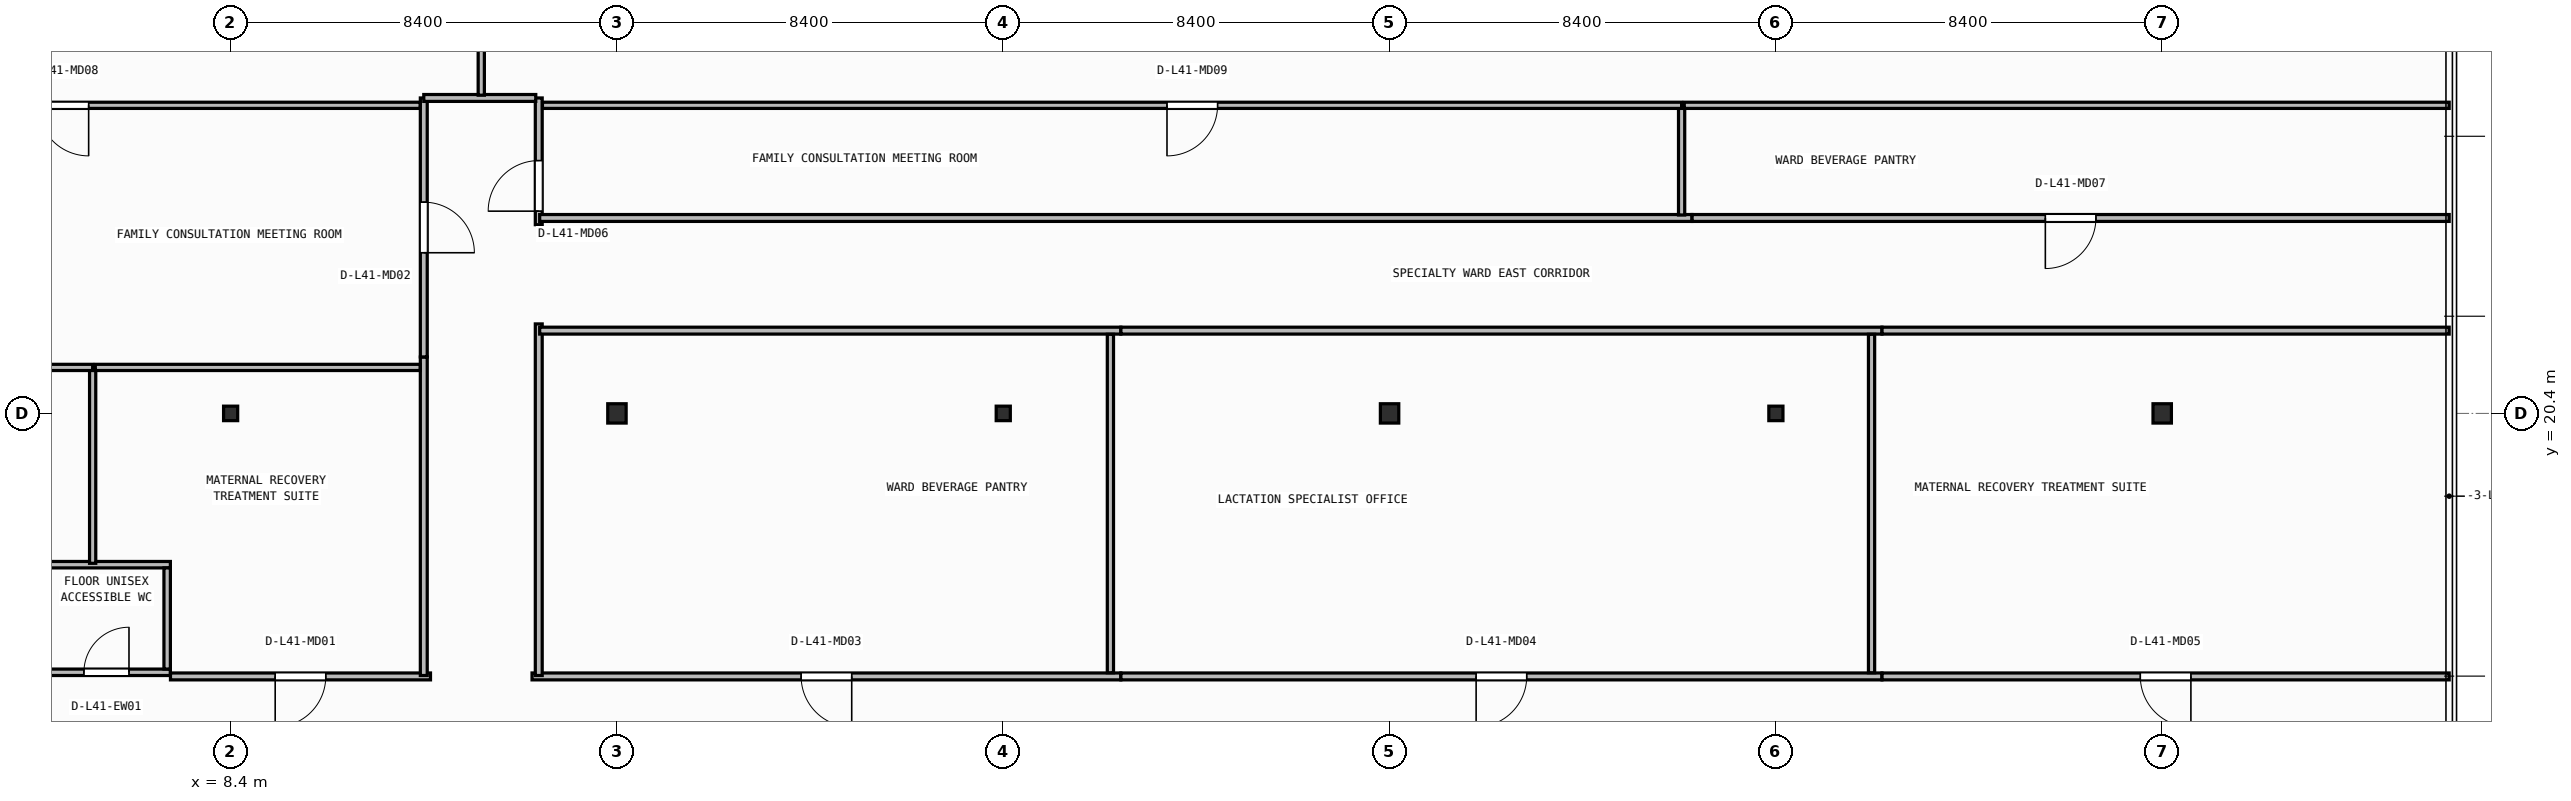
"""IFC4 building model, lengths in metres.
Left out: names, types, materials, properties, quantities, classifications, styles, units other than length and angle.
Written with IfcOpenShell. Run it as: python <this file> out.ifc"""

import sys

from ifc_helpers import new_model, si_unit, direction, frame, frame_2d, origin, origin_2d, place, context, subcontext, project, spatial, rectangle, i_section, extrude, element, fill, save


model = new_model("IFC4")
c1 = context("Model", 3, precision=1e-05, world=origin(), true_north=direction((0.0, 1.0)))
c2 = subcontext(c1, "Body", "Model", "MODEL_VIEW")
j1 = project(units=[si_unit("LENGTHUNIT", "METRE"), si_unit("PLANEANGLEUNIT", "RADIAN")], contexts=[c1])
p1 = place(None, origin())
s1 = spatial("IfcSite", under=j1, at=p1, CompositionType="ELEMENT")
p2 = place(p1, origin())
s2 = spatial("IfcBuilding", under=s1, at=p2, CompositionType="ELEMENT")
p3 = place(p2, frame((0.0, 0.0, 166.55)))
s3 = spatial("IfcBuildingStorey", under=s2, at=p3, CompositionType="ELEMENT", Elevation=166.55)
p4 = place(p3, frame((8.4, 20.4, 0.0), z_axis=(0.0, 0.0, 1.0), x_axis=(1.0, 0.0, 0.0)))
e1 = element("IfcColumn", 1, at=p4, inside=s3, PredefinedType="COLUMN", context=c2, shape_type="SweptSolid", body=[
    extrude(i_section(OverallWidth=0.307, OverallDepth=0.315, WebThickness=0.012, FlangeThickness=0.019, FilletRadius=0.017, at=origin_2d()), origin(), (0.0, 0.0, 1.0), 3.95),
])
p5 = place(p3, frame((16.8, 20.4, 0.0), z_axis=(0.0, 0.0, 1.0), x_axis=(1.0, 0.0, 0.0)))
e2 = element("IfcColumn", 2, at=p5, inside=s3, PredefinedType="COLUMN", context=c2, shape_type="SweptSolid", body=[
    extrude(i_section(OverallWidth=0.4, OverallDepth=0.42, WebThickness=0.025, FlangeThickness=0.04, at=origin_2d()), origin(), (0.0, 0.0, 1.0), 3.95),
])
p6 = place(p3, frame((25.2, 20.4, 0.0), z_axis=(0.0, 0.0, 1.0), x_axis=(1.0, 0.0, 0.0)))
e3 = element("IfcColumn", 3, at=p6, inside=s3, PredefinedType="COLUMN", context=c2, shape_type="SweptSolid", body=[
    extrude(i_section(OverallWidth=0.307, OverallDepth=0.315, WebThickness=0.012, FlangeThickness=0.019, FilletRadius=0.017, at=origin_2d()), origin(), (0.0, 0.0, 1.0), 3.95),
])
p7 = place(p3, frame((33.6, 20.4, 0.0), z_axis=(0.0, 0.0, 1.0), x_axis=(1.0, 0.0, 0.0)))
e4 = element("IfcColumn", 4, at=p7, inside=s3, PredefinedType="COLUMN", context=c2, shape_type="SweptSolid", body=[
    extrude(i_section(OverallWidth=0.4, OverallDepth=0.42, WebThickness=0.025, FlangeThickness=0.04, at=origin_2d()), origin(), (0.0, 0.0, 1.0), 3.95),
])
p8 = place(p3, frame((42.0, 20.4, 0.0), z_axis=(0.0, 0.0, 1.0), x_axis=(1.0, 0.0, 0.0)))
e5 = element("IfcColumn", 5, at=p8, inside=s3, PredefinedType="COLUMN", context=c2, shape_type="SweptSolid", body=[
    extrude(i_section(OverallWidth=0.307, OverallDepth=0.315, WebThickness=0.012, FlangeThickness=0.019, FilletRadius=0.017, at=origin_2d()), origin(), (0.0, 0.0, 1.0), 3.95),
])
p9 = place(p3, frame((50.4, 20.4, 0.0), z_axis=(0.0, 0.0, 1.0), x_axis=(1.0, 0.0, 0.0)))
e6 = element("IfcColumn", 6, at=p9, inside=s3, PredefinedType="COLUMN", context=c2, shape_type="SweptSolid", body=[
    extrude(i_section(OverallWidth=0.4, OverallDepth=0.42, WebThickness=0.025, FlangeThickness=0.04, at=origin_2d()), origin(), (0.0, 0.0, 1.0), 3.95),
])
p10 = place(p3, frame((4.31, 14.77, 0.0), z_axis=(0.0, 0.0, 1.0), x_axis=(1.0, 0.0, 0.0)))
e7 = element("IfcWall", 7, at=p10, inside=s3, PredefinedType="PARTITIONING", context=c2, shape_type="SweptSolid", body=[
    extrude(rectangle(XDim=2.78, YDim=0.14, at=frame_2d((1.39, 0.0))), origin(), (0.0, 0.0, 1.0), 3.71),
])
p11 = place(p10, frame((0.9, 0.0, 0.0)))
e8 = element("IfcOpeningElement", 8, at=p11, cuts=e7, PredefinedType="OPENING", context=c2, shape_type="SweptSolid", body=[
    extrude(rectangle(XDim=0.98, YDim=2.1, at=frame_2d((0.49, 1.05))), frame((0.0, 0.08, 0.0), z_axis=(0.0, -1.0, 0.0), x_axis=(1.0, 0.0, 0.0)), (0.0, 0.0, 1.0), 0.16),
])
p12 = place(p3, frame((4.31, 17.11, 0.0), z_axis=(0.0, 0.0, 1.0), x_axis=(1.0, 0.0, 0.0)))
e9 = element("IfcWall", 9, at=p12, inside=s3, PredefinedType="PARTITIONING", context=c2, shape_type="SweptSolid", body=[
    extrude(rectangle(XDim=2.78, YDim=0.14, at=frame_2d((1.39, 0.0))), origin(), (0.0, 0.0, 1.0), 3.71),
])
p13 = place(p3, frame((7.02, 14.84, 0.0), z_axis=(0.0, 0.0, 1.0), x_axis=(0.0, 1.0, 0.0)))
e10 = element("IfcWall", 10, at=p13, inside=s3, PredefinedType="PARTITIONING", context=c2, shape_type="SweptSolid", body=[
    extrude(rectangle(XDim=2.2, YDim=0.14, at=frame_2d((1.1, 0.0))), origin(), (0.0, 0.0, 1.0), 3.71),
])
p14 = place(p3, frame((12.746, 14.68, 0.0), z_axis=(0.0, 0.0, 1.0), x_axis=(-1.0, 0.0, 0.0)))
e11 = element("IfcWall", 11, at=p14, inside=s3, PredefinedType="PARTITIONING", context=c2, shape_type="SweptSolid", body=[
    extrude(rectangle(XDim=5.654, YDim=0.15, at=frame_2d((2.827, 0.0))), origin(), (0.0, 0.0, 1.0), 3.71),
])
p15 = place(p14, frame((2.277, 0.0, 0.0)))
e12 = element("IfcOpeningElement", 12, at=p15, cuts=e11, PredefinedType="OPENING", context=c2, shape_type="SweptSolid", body=[
    extrude(rectangle(XDim=1.1, YDim=2.1, at=frame_2d((0.55, 1.05))), frame((0.0, 0.085, 0.0), z_axis=(0.0, -1.0, 0.0), x_axis=(1.0, 0.0, 0.0)), (0.0, 0.0, 1.0), 0.17),
])
p16 = place(p3, frame((27.756, 14.68, 0.0), z_axis=(0.0, 0.0, 1.0), x_axis=(-1.0, 0.0, 0.0)))
e13 = element("IfcWall", 13, at=p16, inside=s3, PredefinedType="PARTITIONING", context=c2, shape_type="SweptSolid", body=[
    extrude(rectangle(XDim=12.802, YDim=0.15, at=frame_2d((6.401, 0.0))), origin(), (0.0, 0.0, 1.0), 3.71),
])
p17 = place(p16, frame((5.851, 0.0, 0.0)))
e14 = element("IfcOpeningElement", 14, at=p17, cuts=e13, PredefinedType="OPENING", context=c2, shape_type="SweptSolid", body=[
    extrude(rectangle(XDim=1.1, YDim=2.1, at=frame_2d((0.55, 1.05))), frame((0.0, 0.085, 0.0), z_axis=(0.0, -1.0, 0.0), x_axis=(1.0, 0.0, 0.0)), (0.0, 0.0, 1.0), 0.17),
])
p18 = place(p3, frame((44.306, 14.68, 0.0), z_axis=(0.0, 0.0, 1.0), x_axis=(-1.0, 0.0, 0.0)))
e15 = element("IfcWall", 15, at=p18, inside=s3, PredefinedType="PARTITIONING", context=c2, shape_type="SweptSolid", body=[
    extrude(rectangle(XDim=16.548, YDim=0.15, at=frame_2d((8.274, 0.0))), origin(), (0.0, 0.0, 1.0), 3.71),
])
p19 = place(p18, frame((7.724, 0.0, 0.0)))
e16 = element("IfcOpeningElement", 16, at=p19, cuts=e15, PredefinedType="OPENING", context=c2, shape_type="SweptSolid", body=[
    extrude(rectangle(XDim=1.1, YDim=2.1, at=frame_2d((0.55, 1.05))), frame((0.0, 0.085, 0.0), z_axis=(0.0, -1.0, 0.0), x_axis=(1.0, 0.0, 0.0)), (0.0, 0.0, 1.0), 0.17),
])
p20 = place(p3, frame((56.64, 14.68, 0.0), z_axis=(0.0, 0.0, 1.0), x_axis=(-1.0, 0.0, 0.0)))
e17 = element("IfcWall", 17, at=p20, inside=s3, PredefinedType="PARTITIONING", context=c2, shape_type="SweptSolid", body=[
    extrude(rectangle(XDim=12.332, YDim=0.15, at=frame_2d((6.166, 0.0))), origin(), (0.0, 0.0, 1.0), 3.71),
])
p21 = place(p20, frame((5.616, 0.0, 0.0)))
e18 = element("IfcOpeningElement", 18, at=p21, cuts=e17, PredefinedType="OPENING", context=c2, shape_type="SweptSolid", body=[
    extrude(rectangle(XDim=1.1, YDim=2.1, at=frame_2d((0.55, 1.05))), frame((0.0, 0.085, 0.0), z_axis=(0.0, -1.0, 0.0), x_axis=(1.0, 0.0, 0.0)), (0.0, 0.0, 1.0), 0.17),
])
p22 = place(p3, frame((12.6, 21.626, 0.0), z_axis=(0.0, 0.0, 1.0), x_axis=(0.0, -1.0, 0.0)))
e19 = element("IfcWall", 19, at=p22, inside=s3, PredefinedType="PARTITIONING", context=c2, shape_type="SweptSolid", body=[
    extrude(rectangle(XDim=6.926, YDim=0.15, at=frame_2d((3.463, 0.0))), origin(), (0.0, 0.0, 1.0), 3.71),
])
p23 = place(p3, frame((12.6, 27.26, 0.0), z_axis=(0.0, 0.0, 1.0), x_axis=(0.0, -1.0, 0.0)))
e20 = element("IfcWall", 20, at=p23, inside=s3, PredefinedType="PARTITIONING", context=c2, shape_type="SweptSolid", body=[
    extrude(rectangle(XDim=5.632, YDim=0.15, at=frame_2d((2.816, 0.0))), origin(), (0.0, 0.0, 1.0), 3.71),
])
p24 = place(p23, frame((2.266, 0.0, 0.0)))
e21 = element("IfcOpeningElement", 21, at=p24, cuts=e20, PredefinedType="OPENING", context=c2, shape_type="SweptSolid", body=[
    extrude(rectangle(XDim=1.1, YDim=2.1, at=frame_2d((0.55, 1.05))), frame((0.0, 0.085, 0.0), z_axis=(0.0, -1.0, 0.0), x_axis=(1.0, 0.0, 0.0)), (0.0, 0.0, 1.0), 0.17),
])
p25 = place(p3, frame((15.1, 14.7, 0.0), z_axis=(0.0, 0.0, 1.0), x_axis=(0.0, 1.0, 0.0)))
e22 = element("IfcWall", 22, at=p25, inside=s3, PredefinedType="PARTITIONING", context=c2, shape_type="SweptSolid", body=[
    extrude(rectangle(XDim=7.646, YDim=0.15, at=frame_2d((3.823, 0.0))), origin(), (0.0, 0.0, 1.0), 3.71),
])
p26 = place(p3, frame((15.1, 24.504, 0.0), z_axis=(0.0, 0.0, 1.0), x_axis=(0.0, 1.0, 0.0)))
e23 = element("IfcWall", 23, at=p26, inside=s3, PredefinedType="PARTITIONING", context=c2, shape_type="SweptSolid", body=[
    extrude(rectangle(XDim=2.756, YDim=0.15, at=frame_2d((1.378, 0.0))), origin(), (0.0, 0.0, 1.0), 3.71),
])
p27 = place(p26, frame((0.294, 0.0, 0.0)))
e24 = element("IfcOpeningElement", 24, at=p27, cuts=e23, PredefinedType="OPENING", context=c2, shape_type="SweptSolid", body=[
    extrude(rectangle(XDim=1.1, YDim=2.1, at=frame_2d((0.55, 1.05))), frame((0.0, 0.085, 0.0), z_axis=(0.0, -1.0, 0.0), x_axis=(1.0, 0.0, 0.0)), (0.0, 0.0, 1.0), 0.17),
])
p28 = place(p3, frame((15.035, 27.26, 0.0), z_axis=(0.0, 0.0, 1.0), x_axis=(-1.0, 0.0, 0.0)))
e25 = element("IfcWall", 25, at=p28, inside=s3, PredefinedType="PARTITIONING", context=c2, shape_type="SweptSolid", body=[
    extrude(rectangle(XDim=2.435, YDim=0.15, at=frame_2d((1.217, 0.0))), origin(), (0.0, 0.0, 1.0), 3.71),
])
p29 = place(p3, frame((15.12, 22.2, 0.0), z_axis=(0.0, 0.0, 1.0), x_axis=(1.0, 0.0, 0.0)))
e26 = element("IfcWall", 26, at=p29, inside=s3, PredefinedType="PARTITIONING", context=c2, shape_type="SweptSolid", body=[
    extrude(rectangle(XDim=12.636, YDim=0.15, at=frame_2d((6.318, 0.0))), origin(), (0.0, 0.0, 1.0), 3.71),
])
p30 = place(p3, frame((27.758, 22.2, 0.0), z_axis=(0.0, 0.0, 1.0), x_axis=(1.0, 0.0, 0.0)))
e27 = element("IfcWall", 27, at=p30, inside=s3, PredefinedType="PARTITIONING", context=c2, shape_type="SweptSolid", body=[
    extrude(rectangle(XDim=16.548, YDim=0.15, at=frame_2d((8.274, 0.0))), origin(), (0.0, 0.0, 1.0), 3.71),
])
p31 = place(p3, frame((44.308, 22.2, 0.0), z_axis=(0.0, 0.0, 1.0), x_axis=(1.0, 0.0, 0.0)))
e28 = element("IfcWall", 28, at=p31, inside=s3, PredefinedType="PARTITIONING", context=c2, shape_type="SweptSolid", body=[
    extrude(rectangle(XDim=12.332, YDim=0.15, at=frame_2d((6.166, 0.0))), origin(), (0.0, 0.0, 1.0), 3.71),
])
p32 = place(p3, frame((40.176, 24.65, 0.0), z_axis=(0.0, 0.0, 1.0), x_axis=(-1.0, 0.0, 0.0)))
e29 = element("IfcWall", 29, at=p32, inside=s3, PredefinedType="PARTITIONING", context=c2, shape_type="SweptSolid", body=[
    extrude(rectangle(XDim=25.056, YDim=0.15, at=frame_2d((12.528, 0.0))), origin(), (0.0, 0.0, 1.0), 3.378),
])
p33 = place(p3, frame((56.64, 24.65, 0.0), z_axis=(0.0, 0.0, 1.0), x_axis=(-1.0, 0.0, 0.0)))
e30 = element("IfcWall", 30, at=p33, inside=s3, PredefinedType="PARTITIONING", context=c2, shape_type="SweptSolid", body=[
    extrude(rectangle(XDim=16.462, YDim=0.15, at=frame_2d((8.231, 0.0))), origin(), (0.0, 0.0, 1.0), 3.378),
])
p34 = place(p33, frame((7.681, 0.0, 0.0)))
e31 = element("IfcOpeningElement", 31, at=p34, cuts=e30, PredefinedType="OPENING", context=c2, shape_type="SweptSolid", body=[
    extrude(rectangle(XDim=1.1, YDim=2.1, at=frame_2d((0.55, 1.05))), frame((0.0, 0.085, 0.0), z_axis=(0.0, -1.0, 0.0), x_axis=(1.0, 0.0, 0.0)), (0.0, 0.0, 1.0), 0.17),
])
p35 = place(p3, frame((5.4, 17.14, 0.0), z_axis=(0.0, 0.0, 1.0), x_axis=(0.0, 1.0, 0.0)))
e32 = element("IfcWall", 32, at=p35, inside=s3, PredefinedType="PARTITIONING", context=c2, shape_type="SweptSolid", body=[
    extrude(rectangle(XDim=4.26, YDim=0.135, at=frame_2d((2.13, 0.0))), origin(), (0.0, 0.0, 1.0), 3.71),
])
p36 = place(p3, frame((5.4, 21.4, 0.0), z_axis=(0.0, 0.0, 1.0), x_axis=(-1.0, 0.0, 0.0)))
e33 = element("IfcWall", 33, at=p36, inside=s3, PredefinedType="PARTITIONING", context=c2, shape_type="SweptSolid", body=[
    extrude(rectangle(XDim=5.16, YDim=0.135, at=frame_2d((2.58, 0.0))), origin(), (0.0, 0.0, 1.0), 3.71),
])
p37 = place(p3, frame((12.52, 21.4, 0.0), z_axis=(0.0, 0.0, 1.0), x_axis=(-1.0, 0.0, 0.0)))
e34 = element("IfcWall", 34, at=p37, inside=s3, PredefinedType="PARTITIONING", context=c2, shape_type="SweptSolid", body=[
    extrude(rectangle(XDim=7.062, YDim=0.135, at=frame_2d((3.531, 0.0))), origin(), (0.0, 0.0, 1.0), 3.71),
])
p38 = place(p3, frame((12.52, 27.1, 0.0), z_axis=(0.0, 0.0, 1.0), x_axis=(-1.0, 0.0, 0.0)))
e35 = element("IfcWall", 35, at=p38, inside=s3, PredefinedType="PARTITIONING", context=c2, shape_type="SweptSolid", body=[
    extrude(rectangle(XDim=12.28, YDim=0.135, at=frame_2d((6.14, 0.0))), origin(), (0.0, 0.0, 1.0), 3.71),
])
p39 = place(p38, frame((7.207, 0.0, 0.0)))
e36 = element("IfcOpeningElement", 36, at=p39, cuts=e35, PredefinedType="OPENING", context=c2, shape_type="SweptSolid", body=[
    extrude(rectangle(XDim=1.1, YDim=2.1, at=frame_2d((0.55, 1.05))), frame((0.0, 0.077, 0.0), z_axis=(0.0, -1.0, 0.0), x_axis=(1.0, 0.0, 0.0)), (0.0, 0.0, 1.0), 0.155),
])
for number, where, z_axis, x_axis in (
    (37, (27.53, 14.76, 0.0), (0.0, 0.0, 1.0), (0.0, 1.0, 0.0)),
    (38, (44.08, 14.76, 0.0), (0.0, 0.0, 1.0), (0.0, 1.0, 0.0)),
):
    element("IfcWall", number, at=place(p3, frame(where, z_axis=z_axis, x_axis=x_axis)), inside=s3, PredefinedType="PARTITIONING", context=c2, shape_type="SweptSolid", body=[
        extrude(rectangle(XDim=7.36, YDim=0.135, at=frame_2d((3.68, 0.0))), origin(), (0.0, 0.0, 1.0), 3.71),
    ])
p40 = place(p3, frame((39.95, 24.715, 0.0), z_axis=(0.0, 0.0, 1.0), x_axis=(0.0, 1.0, 0.0)))
e39 = element("IfcWall", 39, at=p40, inside=s3, PredefinedType="PARTITIONING", context=c2, shape_type="SweptSolid", body=[
    extrude(rectangle(XDim=2.385, YDim=0.135, at=frame_2d((1.192, 0.0))), origin(), (0.0, 0.0, 1.0), 3.71),
])
p41 = place(p3, frame((39.95, 27.1, 0.0), z_axis=(0.0, 0.0, 1.0), x_axis=(-1.0, 0.0, 0.0)))
e40 = element("IfcWall", 40, at=p41, inside=s3, PredefinedType="PARTITIONING", context=c2, shape_type="SweptSolid", body=[
    extrude(rectangle(XDim=24.77, YDim=0.135, at=frame_2d((12.385, 0.0))), origin(), (0.0, 0.0, 1.0), 3.71),
])
p42 = place(p41, frame((10.09, 0.0, 0.0)))
e41 = element("IfcOpeningElement", 41, at=p42, cuts=e40, PredefinedType="OPENING", context=c2, shape_type="SweptSolid", body=[
    extrude(rectangle(XDim=1.1, YDim=2.1, at=frame_2d((0.55, 1.05))), frame((0.0, 0.077, 0.0), z_axis=(0.0, -1.0, 0.0), x_axis=(1.0, 0.0, 0.0)), (0.0, 0.0, 1.0), 0.155),
])
p43 = place(p3, frame((56.64, 27.1, 0.0), z_axis=(0.0, 0.0, 1.0), x_axis=(-1.0, 0.0, 0.0)))
e42 = element("IfcWall", 42, at=p43, inside=s3, PredefinedType="PARTITIONING", context=c2, shape_type="SweptSolid", body=[
    extrude(rectangle(XDim=16.632, YDim=0.135, at=frame_2d((8.316, 0.0))), origin(), (0.0, 0.0, 1.0), 3.71),
])
p44 = place(p3, frame((13.85, 27.32, 0.0), z_axis=(0.0, 0.0, 1.0), x_axis=(0.0, 1.0, 0.0)))
e43 = element("IfcWall", 43, at=p44, inside=s3, PredefinedType="PARTITIONING", context=c2, shape_type="SweptSolid", body=[
    extrude(rectangle(XDim=8.96, YDim=0.135, at=frame_2d((4.48, 0.0))), origin(), (0.0, 0.0, 1.0), 3.71),
])
p45 = place(p11, origin())
e44 = element("IfcDoor", 44, at=p45, inside=s3, OperationType="SINGLE_SWING_RIGHT", PredefinedType="DOOR", context=c2, shape_type="SweptSolid", body=[
    extrude(rectangle(XDim=0.98, YDim=2.1, at=frame_2d((0.49, 1.05))), frame((0.0, 0.025, 0.0), z_axis=(0.0, -1.0, 0.0), x_axis=(1.0, 0.0, 0.0)), (0.0, 0.0, 1.0), 0.05),
])
fill(e8, e44)
p46 = place(p15, origin())
e45 = element("IfcDoor", 45, at=p46, inside=s3, OperationType="SINGLE_SWING_RIGHT", PredefinedType="DOOR", context=c2, shape_type="SweptSolid", body=[
    extrude(rectangle(XDim=1.1, YDim=2.1, at=frame_2d((0.55, 1.05))), frame((0.0, 0.025, 0.0), z_axis=(0.0, -1.0, 0.0), x_axis=(1.0, 0.0, 0.0)), (0.0, 0.0, 1.0), 0.05),
])
fill(e12, e45)
p47 = place(p17, origin())
e46 = element("IfcDoor", 46, at=p47, inside=s3, OperationType="SINGLE_SWING_LEFT", PredefinedType="DOOR", context=c2, shape_type="SweptSolid", body=[
    extrude(rectangle(XDim=1.1, YDim=2.1, at=frame_2d((0.55, 1.05))), frame((0.0, 0.025, 0.0), z_axis=(0.0, -1.0, 0.0), x_axis=(1.0, 0.0, 0.0)), (0.0, 0.0, 1.0), 0.05),
])
fill(e14, e46)
p48 = place(p19, origin())
e47 = element("IfcDoor", 47, at=p48, inside=s3, OperationType="SINGLE_SWING_RIGHT", PredefinedType="DOOR", context=c2, shape_type="SweptSolid", body=[
    extrude(rectangle(XDim=1.1, YDim=2.1, at=frame_2d((0.55, 1.05))), frame((0.0, 0.025, 0.0), z_axis=(0.0, -1.0, 0.0), x_axis=(1.0, 0.0, 0.0)), (0.0, 0.0, 1.0), 0.05),
])
fill(e16, e47)
p49 = place(p21, origin())
e48 = element("IfcDoor", 48, at=p49, inside=s3, OperationType="SINGLE_SWING_LEFT", PredefinedType="DOOR", context=c2, shape_type="SweptSolid", body=[
    extrude(rectangle(XDim=1.1, YDim=2.1, at=frame_2d((0.55, 1.05))), frame((0.0, 0.025, 0.0), z_axis=(0.0, -1.0, 0.0), x_axis=(1.0, 0.0, 0.0)), (0.0, 0.0, 1.0), 0.05),
])
fill(e18, e48)
p50 = place(p24, origin())
e49 = element("IfcDoor", 49, at=p50, inside=s3, OperationType="SINGLE_SWING_RIGHT", PredefinedType="DOOR", context=c2, shape_type="SweptSolid", body=[
    extrude(rectangle(XDim=1.1, YDim=2.1, at=frame_2d((0.55, 1.05))), frame((0.0, 0.025, 0.0), z_axis=(0.0, -1.0, 0.0), x_axis=(1.0, 0.0, 0.0)), (0.0, 0.0, 1.0), 0.05),
])
fill(e21, e49)
p51 = place(p27, origin())
e50 = element("IfcDoor", 50, at=p51, inside=s3, OperationType="SINGLE_SWING_LEFT", PredefinedType="DOOR", context=c2, shape_type="SweptSolid", body=[
    extrude(rectangle(XDim=1.1, YDim=2.1, at=frame_2d((0.55, 1.05))), frame((0.0, 0.025, 0.0), z_axis=(0.0, -1.0, 0.0), x_axis=(1.0, 0.0, 0.0)), (0.0, 0.0, 1.0), 0.05),
])
fill(e24, e50)
p52 = place(p34, origin())
e51 = element("IfcDoor", 51, at=p52, inside=s3, OperationType="SINGLE_SWING_RIGHT", PredefinedType="DOOR", context=c2, shape_type="SweptSolid", body=[
    extrude(rectangle(XDim=1.1, YDim=2.1, at=frame_2d((0.55, 1.05))), frame((0.0, 0.025, 0.0), z_axis=(0.0, -1.0, 0.0), x_axis=(1.0, 0.0, 0.0)), (0.0, 0.0, 1.0), 0.05),
])
fill(e31, e51)
p53 = place(p39, origin())
e52 = element("IfcDoor", 52, at=p53, inside=s3, OperationType="SINGLE_SWING_LEFT", PredefinedType="DOOR", context=c2, shape_type="SweptSolid", body=[
    extrude(rectangle(XDim=1.1, YDim=2.1, at=frame_2d((0.55, 1.05))), frame((0.0, 0.025, 0.0), z_axis=(0.0, -1.0, 0.0), x_axis=(1.0, 0.0, 0.0)), (0.0, 0.0, 1.0), 0.05),
])
fill(e36, e52)
p54 = place(p42, origin())
e53 = element("IfcDoor", 53, at=p54, inside=s3, OperationType="SINGLE_SWING_RIGHT", PredefinedType="DOOR", context=c2, shape_type="SweptSolid", body=[
    extrude(rectangle(XDim=1.1, YDim=2.1, at=frame_2d((0.55, 1.05))), frame((0.0, 0.025, 0.0), z_axis=(0.0, -1.0, 0.0), x_axis=(1.0, 0.0, 0.0)), (0.0, 0.0, 1.0), 0.05),
])
fill(e41, e53)
save(model, sys.argv[1])
